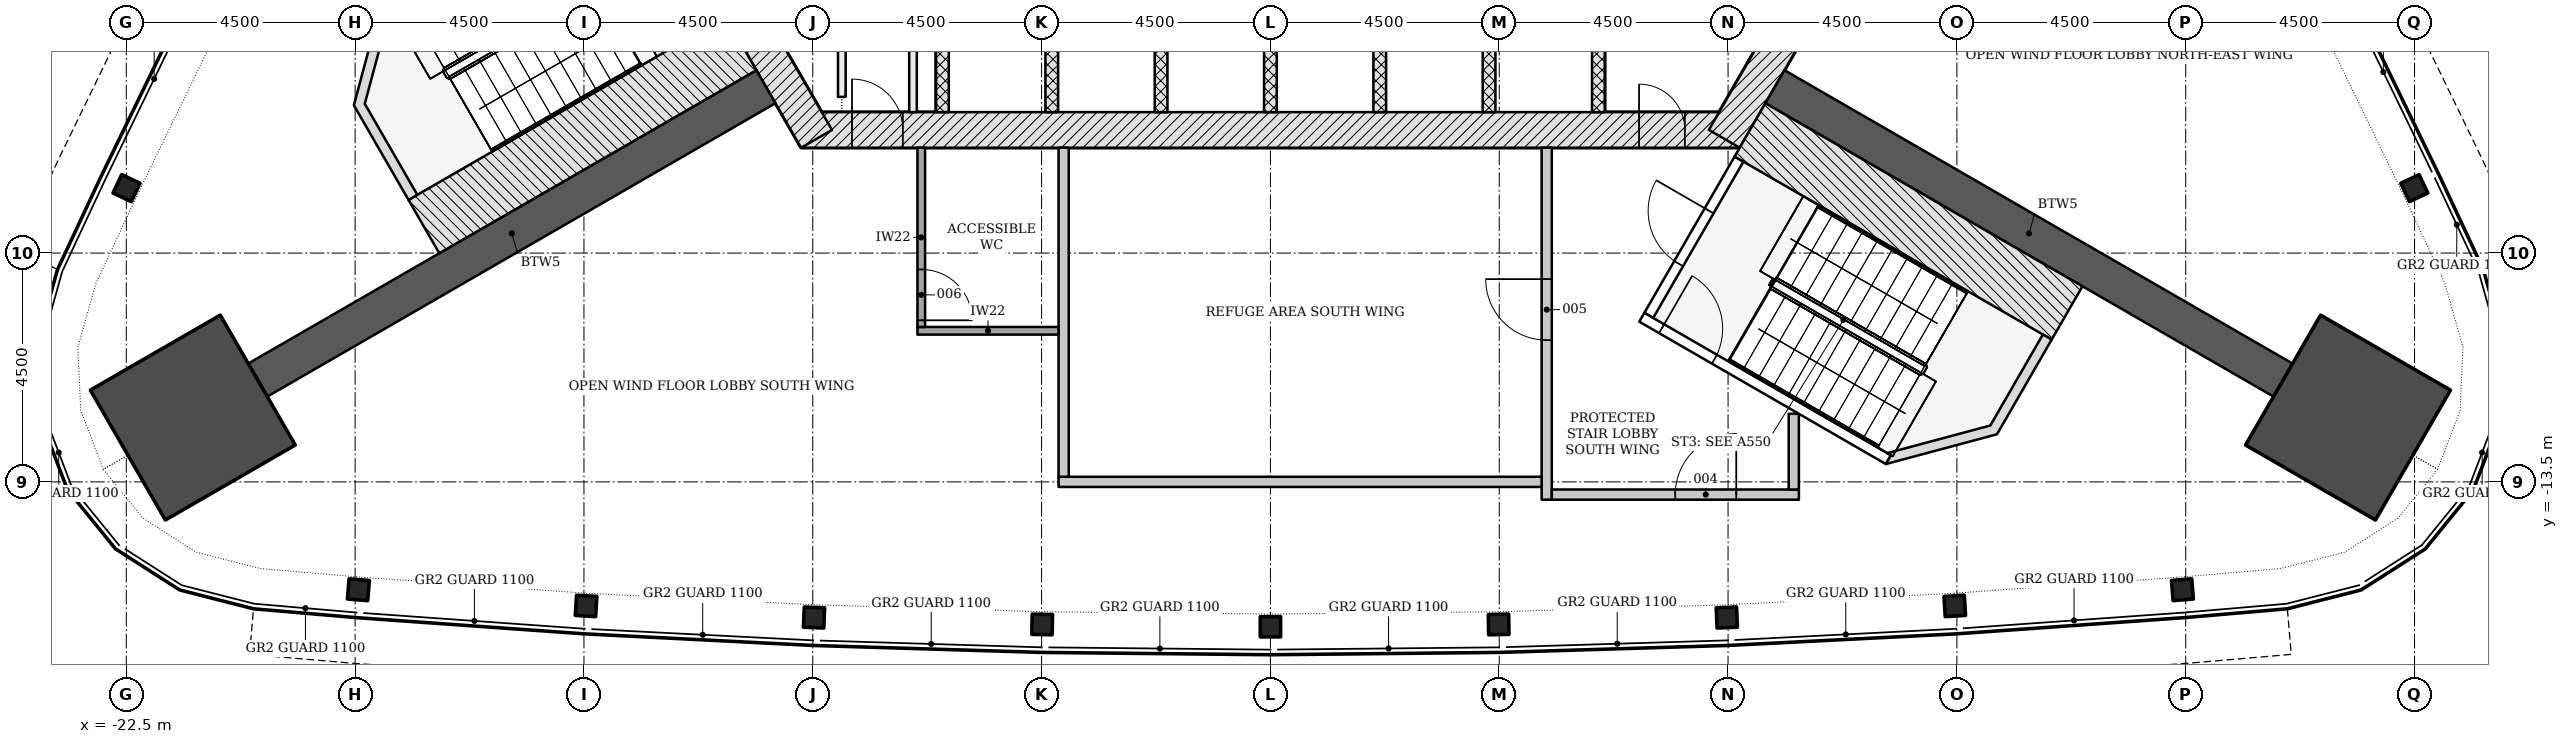
"""IFC4 building model, lengths in metres.
Left out: names, types, materials, properties, quantities, classifications, styles, units other than length and angle.
Written with IfcOpenShell. Run it as: python <this file> out.ifc"""

import sys

from ifc_helpers import new_model, si_unit, direction, frame, frame_2d, origin, origin_2d, place, context, subcontext, project, spatial, polyline, rectangle, i_section, outline, extrude, element, fill, save


model = new_model("IFC4")
c1 = context("Model", 3, precision=1e-05, world=origin(), true_north=direction((0.0, 1.0)))
c2 = subcontext(c1, "Body", "Model", "MODEL_VIEW")
j1 = project(units=[si_unit("LENGTHUNIT", "METRE"), si_unit("PLANEANGLEUNIT", "RADIAN")], contexts=[c1])
p1 = place(None, origin())
s1 = spatial("IfcSite", under=j1, at=p1, CompositionType="ELEMENT")
p2 = place(p1, origin())
s2 = spatial("IfcBuilding", under=s1, at=p2, CompositionType="ELEMENT")
p3 = place(p2, frame((0.0, 0.0, 127.5)))
s3 = spatial("IfcBuildingStorey", under=s2, at=p3, CompositionType="ELEMENT", Elevation=127.5)
p4 = place(p3, frame((-9.229, -6.578, -0.3), z_axis=(0.0, 0.0, 1.0), x_axis=(1.0, 0.0, 0.0)))
e1 = element("IfcWall", 1, at=p4, inside=s3, PredefinedType="SHEAR", context=c2, shape_type="SweptSolid", body=[
    extrude(rectangle(XDim=18.458, YDim=0.7, at=frame_2d((9.229, 0.0))), origin(), (0.0, 0.0, 1.0), 7.2),
])
p5 = place(p4, frame((1.0, 0.0, 0.3)))
e2 = element("IfcOpeningElement", 2, at=p5, cuts=e1, PredefinedType="OPENING", context=c2, shape_type="SweptSolid", body=[
    extrude(rectangle(XDim=1.0, YDim=2.1, at=frame_2d((0.5, 1.05))), frame((0.0, 0.36, 0.0), z_axis=(0.0, -1.0, 0.0), x_axis=(1.0, 0.0, 0.0)), (0.0, 0.0, 1.0), 0.72),
])
p6 = place(p4, frame((16.479, 0.0, 0.3)))
e3 = element("IfcOpeningElement", 3, at=p6, cuts=e1, PredefinedType="OPENING", context=c2, shape_type="SweptSolid", body=[
    extrude(rectangle(XDim=0.9, YDim=2.1, at=frame_2d((0.45, 1.05))), frame((0.0, 0.36, 0.0), z_axis=(0.0, -1.0, 0.0), x_axis=(1.0, 0.0, 0.0)), (0.0, 0.0, 1.0), 0.72),
])
for number, where, z_axis, x_axis in (
    (4, (8.926, -6.753, -0.3), (0.0, 0.0, 1.0), (0.5, 0.866, 0.0)),
    (5, (-10.311, -4.353, -0.3), (0.0, 0.0, 1.0), (0.5, -0.866, 0.0)),
):
    element("IfcWall", number, at=place(p3, frame(where, z_axis=z_axis, x_axis=x_axis)), inside=s3, PredefinedType="SHEAR", context=c2, shape_type="SweptSolid", body=[
        extrude(rectangle(XDim=2.771, YDim=0.7, at=frame_2d((1.386, 0.0))), origin(), (0.0, 0.0, 1.0), 7.2),
    ])
for number, where, z_axis, x_axis in (
    (6, (-9.922, -5.728, -0.3), (0.0, 0.0, 1.0), (-0.866, -0.5, 0.0)),
    (7, (9.922, -5.728, -0.3), (0.0, 0.0, 1.0), (0.866, -0.5, 0.0)),
):
    element("IfcWall", number, at=place(p3, frame(where, z_axis=z_axis, x_axis=x_axis)), inside=s3, PredefinedType="SHEAR", context=c2, shape_type="SweptSolid", body=[
        extrude(rectangle(XDim=11.539, YDim=0.75, at=frame_2d((5.769, 0.0))), origin(), (0.0, 0.0, 1.0), 7.2),
    ])
for number, where, z_axis, x_axis in (
    (8, (-21.192, -12.235, -0.3), (0.0, 0.0, 1.0), (-0.866, -0.5, 0.0)),
    (9, (21.192, -12.235, -0.3), (0.0, 0.0, 1.0), (0.866, -0.5, 0.0)),
):
    element("IfcColumn", number, at=place(p3, frame(where, z_axis=z_axis, x_axis=x_axis)), inside=s3, PredefinedType="COLUMN", context=c2, shape_type="SweptSolid", body=[
        extrude(rectangle(XDim=2.95, YDim=2.95, at=origin_2d()), origin(), (0.0, 0.0, 1.0), 7.2),
    ])
for number, where, z_axis, x_axis in (
    (10, (-22.496, -7.722, -0.3), (0.0, 0.0, 1.0), (-0.428, -0.904, 0.0)),
    (11, (-17.936, -15.621, -0.3), (0.0, 0.0, 1.0), (0.997, -0.081, 0.0)),
    (12, (-13.458, -15.939, -0.3), (0.0, 0.0, 1.0), (0.998, -0.061, 0.0)),
    (13, (-8.975, -16.167, -0.3), (0.0, 0.0, 1.0), (0.999, -0.041, 0.0)),
    (14, (-4.489, -16.304, -0.3), (0.0, 0.0, 1.0), (1.0, -0.02, 0.0)),
    (15, (0.0, -16.349, -0.3), (0.0, 0.0, 1.0), (1.0, 0.0, 0.0)),
    (16, (4.489, -16.304, -0.3), (0.0, 0.0, 1.0), (1.0, 0.02, 0.0)),
    (17, (8.975, -16.167, -0.3), (0.0, 0.0, 1.0), (0.999, 0.041, 0.0)),
    (18, (13.458, -15.939, -0.3), (0.0, 0.0, 1.0), (0.998, 0.061, 0.0)),
    (19, (17.936, -15.621, -0.3), (0.0, 0.0, 1.0), (0.997, 0.081, 0.0)),
    (20, (22.496, -7.722, -0.3), (0.0, 0.0, 1.0), (-0.428, 0.904, 0.0)),
):
    element("IfcColumn", number, at=place(p3, frame(where, z_axis=z_axis, x_axis=x_axis)), inside=s3, PredefinedType="COLUMN", context=c2, shape_type="SweptSolid", body=[
        extrude(i_section(OverallWidth=0.401, OverallDepth=0.399, WebThickness=0.025, FlangeThickness=0.04, FilletRadius=0.015, at=origin_2d()), origin(), (0.0, 0.0, 1.0), 7.2),
    ])
for number, where, z_axis, x_axis in (
    (21, (-6.45, -6.228, -0.3), (0.0, 0.0, 1.0), (0.0, 1.0, 0.0)),
    (22, (-4.3, -6.228, -0.3), (0.0, 0.0, 1.0), (0.0, 1.0, 0.0)),
    (23, (-2.15, -6.228, -0.3), (0.0, 0.0, 1.0), (0.0, 1.0, 0.0)),
    (24, (0.0, -6.228, -0.3), (0.0, 0.0, 1.0), (0.0, 1.0, 0.0)),
    (25, (2.15, -6.228, -0.3), (0.0, 0.0, 1.0), (0.0, 1.0, 0.0)),
    (26, (4.3, -6.228, -0.3), (0.0, 0.0, 1.0), (0.0, 1.0, 0.0)),
    (27, (6.45, -6.228, -0.3), (0.0, 0.0, 1.0), (0.0, 1.0, 0.0)),
):
    element("IfcWall", number, at=place(p3, frame(where, z_axis=z_axis, x_axis=x_axis)), inside=s3, PredefinedType="PARTITIONING", context=c2, shape_type="SweptSolid", body=[
        extrude(rectangle(XDim=2.5, YDim=0.25, at=frame_2d((1.25, 0.0))), origin(), (0.0, 0.0, 1.0), 7.2),
    ])
p7 = place(p3, frame((-8.429, -5.928, 0.0), z_axis=(0.0, 0.0, 1.0), x_axis=(0.0, 1.0, 0.0)))
e28 = element("IfcWall", 28, at=p7, inside=s3, PredefinedType="PARTITIONING", context=c2, shape_type="SweptSolid", body=[
    extrude(rectangle(XDim=3.656, YDim=0.15, at=frame_2d((1.828, 0.0))), origin(), (0.0, 0.0, 1.0), 6.9),
])
p8 = place(p7, frame((1.378, 0.0, 0.0)))
e29 = element("IfcOpeningElement", 29, at=p8, cuts=e28, PredefinedType="OPENING", context=c2, shape_type="SweptSolid", body=[
    extrude(rectangle(XDim=0.9, YDim=2.1, at=frame_2d((0.45, 1.05))), frame((0.0, 0.085, 0.0), z_axis=(0.0, -1.0, 0.0), x_axis=(1.0, 0.0, 0.0)), (0.0, 0.0, 1.0), 0.17),
])
p9 = place(p3, frame((-7.029, -2.8, 0.0), z_axis=(0.0, 0.0, 1.0), x_axis=(0.0, -1.0, 0.0)))
e30 = element("IfcWall", 30, at=p9, inside=s3, PredefinedType="PARTITIONING", context=c2, shape_type="SweptSolid", body=[
    extrude(rectangle(XDim=3.428, YDim=0.15, at=frame_2d((1.714, 0.0))), origin(), (0.0, 0.0, 1.0), 6.9),
])
p10 = place(p9, frame((1.264, 0.0, 0.0)))
e31 = element("IfcOpeningElement", 31, at=p10, cuts=e30, PredefinedType="OPENING", context=c2, shape_type="SweptSolid", body=[
    extrude(rectangle(XDim=0.9, YDim=2.1, at=frame_2d((0.45, 1.05))), frame((0.0, 0.085, 0.0), z_axis=(0.0, -1.0, 0.0), x_axis=(1.0, 0.0, 0.0)), (0.0, 0.0, 1.0), 0.17),
])
p11 = place(p3, frame((-10.412, -4.879, -0.3), z_axis=(0.0, 0.0, 1.0), x_axis=(-0.866026919366, -0.499997374926, 0.0)))
e32 = element("IfcWall", 32, at=p11, inside=s3, PredefinedType="SHEAR", context=c2, shape_type="SweptSolid", body=[
    extrude(rectangle(XDim=7.2, YDim=1.211, at=frame_2d((3.6, 0.0))), origin(), (0.0, 0.0, 1.0), 7.2),
])
p12 = place(p3, frame((0.0, 0.0, -0.3)))
e33 = element("IfcWall", 33, at=p12, inside=s3, PredefinedType="SHEAR", context=c2, shape_type="SweptSolid", body=[
    extrude(outline(polyline([(-17.439, -3.907), (-18.025, -6.093), (-16.95, -7.955), (-16.777, -7.855), (-17.81, -6.065), (-17.267, -4.039), (-17.339, -4.081), (-17.339, -4.081), (-17.339, -4.081), (-17.339, -4.081), (-17.339, -4.081), (-17.339, -4.081), (-17.339, -4.081), (-17.339, -4.081), (-17.339, -4.081), (-17.339, -4.081), (-17.339, -4.081), (-17.339, -4.081), (-17.339, -4.081), (-17.339, -4.081), (-17.339, -4.081), (-17.339, -4.081), (-17.339, -4.081), (-17.439, -3.907)])), origin(), (0.0, 0.0, 1.0), 7.2),
])
p13 = place(p3, frame((7.44, -10.226, -0.3), z_axis=(0.0, 0.0, 1.0), x_axis=(0.500022077904, 0.866012656725, 0.0)))
e34 = element("IfcWall", 34, at=p13, inside=s3, PredefinedType="SHEAR", context=c2, shape_type="SweptSolid", body=[
    extrude(rectangle(XDim=3.55, YDim=0.2, at=frame_2d((1.775, 0.0))), origin(), (0.0, 0.0, 1.0), 7.2),
])
p14 = place(p13, frame((1.175, 0.0, 0.3)))
e35 = element("IfcOpeningElement", 35, at=p14, cuts=e34, PredefinedType="OPENING", context=c2, shape_type="SweptSolid", body=[
    extrude(rectangle(XDim=1.2, YDim=2.1, at=frame_2d((0.6, 1.05))), frame((0.0, 0.11, 0.0), z_axis=(0.0, -1.0, 0.0), x_axis=(1.0, 0.0, 0.0)), (0.0, 0.0, 1.0), 0.22),
])
p15 = place(p3, frame((7.304, -10.262, -0.3), z_axis=(0.0, 0.0, 1.0), x_axis=(0.866026594901, -0.49999793692, 0.0)))
e36 = element("IfcWall", 36, at=p15, inside=s3, PredefinedType="SHEAR", context=c2, shape_type="SweptSolid", body=[
    extrude(rectangle(XDim=5.6, YDim=0.2, at=frame_2d((2.8, 0.0))), origin(), (0.0, 0.0, 1.0), 7.2),
])
p16 = place(p15, frame((0.45, 0.0, 0.3)))
e37 = element("IfcOpeningElement", 37, at=p16, cuts=e36, PredefinedType="OPENING", context=c2, shape_type="SweptSolid", body=[
    extrude(rectangle(XDim=1.2, YDim=2.1, at=frame_2d((0.6, 1.05))), frame((0.0, 0.11, 0.0), z_axis=(0.0, -1.0, 0.0), x_axis=(1.0, 0.0, 0.0)), (0.0, 0.0, 1.0), 0.22),
])
p17 = place(p3, frame((9.431, -6.577, -0.3), z_axis=(0.0, 0.0, 1.0), x_axis=(0.866018442252, -0.500012057535, 0.0)))
e38 = element("IfcWall", 38, at=p17, inside=s3, PredefinedType="SHEAR", context=c2, shape_type="SweptSolid", body=[
    extrude(rectangle(XDim=7.2, YDim=1.211, at=frame_2d((3.6, 0.0))), origin(), (0.0, 0.0, 1.0), 7.2),
])
p18 = place(p3, frame((0.0, 0.0, -0.3)))
e39 = element("IfcWall", 39, at=p18, inside=s3, PredefinedType="SHEAR", context=c2, shape_type="SweptSolid", body=[
    extrude(outline(polyline([(12.104, -13.149), (14.289, -12.563), (15.364, -10.701), (15.191, -10.601), (14.157, -12.392), (12.132, -12.934), (12.204, -12.976), (12.204, -12.976), (12.204, -12.976), (12.204, -12.976), (12.204, -12.976), (12.204, -12.976), (12.204, -12.976), (12.204, -12.976), (12.204, -12.976), (12.204, -12.976), (12.204, -12.976), (12.204, -12.976), (12.204, -12.976), (12.204, -12.976), (12.204, -12.976), (12.204, -12.976), (12.204, -12.976), (12.104, -13.149)])), origin(), (0.0, 0.0, 1.0), 7.2),
])
p19 = place(p3, frame((5.434, -13.85, 0.0), z_axis=(0.0, 0.0, 1.0), x_axis=(0.0, 1.0, 0.0)))
e40 = element("IfcWall", 40, at=p19, inside=s3, PredefinedType="PARTITIONING", context=c2, shape_type="SweptSolid", body=[
    extrude(rectangle(XDim=6.922, YDim=0.2, at=frame_2d((3.461, 0.0))), origin(), (0.0, 0.0, 1.0), 6.9),
])
p20 = place(p19, frame((3.138, 0.0, 0.0)))
e41 = element("IfcOpeningElement", 41, at=p20, cuts=e40, PredefinedType="OPENING", context=c2, shape_type="SweptSolid", body=[
    extrude(rectangle(XDim=1.2, YDim=2.1, at=frame_2d((0.6, 1.05))), frame((0.0, 0.11, 0.0), z_axis=(0.0, -1.0, 0.0), x_axis=(1.0, 0.0, 0.0)), (0.0, 0.0, 1.0), 0.22),
])
p21 = place(p3, frame((-4.167, -13.499, 0.0), z_axis=(0.0, 0.0, 1.0), x_axis=(1.0, 0.0, 0.0)))
e42 = element("IfcWall", 42, at=p21, inside=s3, PredefinedType="PARTITIONING", context=c2, shape_type="SweptSolid", body=[
    extrude(rectangle(XDim=9.5, YDim=0.2, at=frame_2d((4.75, 0.0))), origin(), (0.0, 0.0, 1.0), 6.347),
])
p22 = place(p3, frame((5.534, -13.75, 0.0), z_axis=(0.0, 0.0, 1.0), x_axis=(1.0, 0.0, 0.0)))
e43 = element("IfcWall", 43, at=p22, inside=s3, PredefinedType="PARTITIONING", context=c2, shape_type="SweptSolid", body=[
    extrude(rectangle(XDim=4.859, YDim=0.2, at=frame_2d((2.429, 0.0))), origin(), (0.0, 0.0, 1.0), 6.423),
])
p23 = place(p22, frame((2.427, 0.0, 0.0)))
e44 = element("IfcOpeningElement", 44, at=p23, cuts=e43, PredefinedType="OPENING", context=c2, shape_type="SweptSolid", body=[
    extrude(rectangle(XDim=1.2, YDim=2.1, at=frame_2d((0.6, 1.05))), frame((0.0, 0.11, 0.0), z_axis=(0.0, -1.0, 0.0), x_axis=(1.0, 0.0, 0.0)), (0.0, 0.0, 1.0), 0.22),
])
p24 = place(p3, frame((10.292, -13.65, 0.0), z_axis=(0.0, 0.0, 1.0), x_axis=(0.0, 1.0, 0.0)))
e45 = element("IfcWall", 45, at=p24, inside=s3, PredefinedType="PARTITIONING", context=c2, shape_type="SweptSolid", body=[
    extrude(rectangle(XDim=1.489, YDim=0.2, at=frame_2d((0.744, 0.0))), origin(), (0.0, 0.0, 1.0), 6.9),
])
p25 = place(p3, frame((-4.066, -13.399, 0.0), z_axis=(0.0, 0.0, 1.0), x_axis=(0.0, 1.0, 0.0)))
e46 = element("IfcWall", 46, at=p25, inside=s3, PredefinedType="PARTITIONING", context=c2, shape_type="SweptSolid", body=[
    extrude(rectangle(XDim=6.471, YDim=0.2, at=frame_2d((3.235, 0.0))), origin(), (0.0, 0.0, 1.0), 6.9),
])
p26 = place(p3, frame((-6.941, -10.528, 0.0), z_axis=(0.0, 0.0, 1.0), x_axis=(1.0, 0.0, 0.0)))
e47 = element("IfcWall", 47, at=p26, inside=s3, PredefinedType="PARTITIONING", context=c2, shape_type="SweptSolid", body=[
    extrude(rectangle(XDim=2.775, YDim=0.15, at=frame_2d((1.387, 0.0))), origin(), (0.0, 0.0, 1.0), 6.347),
])
p27 = place(p3, frame((-6.866, -6.928, 0.0), z_axis=(0.0, 0.0, 1.0), x_axis=(0.0, -1.0, 0.0)))
e48 = element("IfcWall", 48, at=p27, inside=s3, PredefinedType="PARTITIONING", context=c2, shape_type="SweptSolid", body=[
    extrude(rectangle(XDim=3.525, YDim=0.15, at=frame_2d((1.762, 0.0))), origin(), (0.0, 0.0, 1.0), 6.9),
])
p28 = place(p27, frame((2.394, 0.0, 0.0)))
e49 = element("IfcOpeningElement", 49, at=p28, cuts=e48, PredefinedType="OPENING", context=c2, shape_type="SweptSolid", body=[
    extrude(rectangle(XDim=1.0, YDim=2.1, at=frame_2d((0.5, 1.05))), frame((0.0, 0.085, 0.0), z_axis=(0.0, -1.0, 0.0), x_axis=(1.0, 0.0, 0.0)), (0.0, 0.0, 1.0), 0.17),
])
p29 = place(p5, origin())
e50 = element("IfcDoor", 50, at=p29, inside=s3, OperationType="SINGLE_SWING_LEFT", PredefinedType="DOOR", context=c2, shape_type="SweptSolid", body=[
    extrude(rectangle(XDim=1.0, YDim=2.1, at=frame_2d((0.5, 1.05))), frame((0.0, 0.075, 0.0), z_axis=(0.0, -1.0, 0.0), x_axis=(1.0, 0.0, 0.0)), (0.0, 0.0, 1.0), 0.15),
])
fill(e2, e50)
p30 = place(p6, origin())
e51 = element("IfcDoor", 51, at=p30, inside=s3, OperationType="SINGLE_SWING_LEFT", PredefinedType="DOOR", context=c2, shape_type="SweptSolid", body=[
    extrude(rectangle(XDim=0.9, YDim=2.1, at=frame_2d((0.45, 1.05))), frame((0.0, 0.075, 0.0), z_axis=(0.0, -1.0, 0.0), x_axis=(1.0, 0.0, 0.0)), (0.0, 0.0, 1.0), 0.15),
])
fill(e3, e51)
p31 = place(p14, origin())
e52 = element("IfcDoor", 52, at=p31, inside=s3, OperationType="SINGLE_SWING_RIGHT", PredefinedType="DOOR", context=c2, shape_type="SweptSolid", body=[
    extrude(rectangle(XDim=1.2, YDim=2.1, at=frame_2d((0.6, 1.05))), frame((0.0, 0.025, 0.0), z_axis=(0.0, -1.0, 0.0), x_axis=(1.0, 0.0, 0.0)), (0.0, 0.0, 1.0), 0.05),
])
fill(e35, e52)
p32 = place(p16, origin())
e53 = element("IfcDoor", 53, at=p32, inside=s3, OperationType="SINGLE_SWING_LEFT", PredefinedType="DOOR", context=c2, shape_type="SweptSolid", body=[
    extrude(rectangle(XDim=1.2, YDim=2.1, at=frame_2d((0.6, 1.05))), frame((0.0, 0.025, 0.0), z_axis=(0.0, -1.0, 0.0), x_axis=(1.0, 0.0, 0.0)), (0.0, 0.0, 1.0), 0.05),
])
fill(e37, e53)
p33 = place(p23, origin())
e54 = element("IfcDoor", 54, at=p33, inside=s3, OperationType="SINGLE_SWING_RIGHT", PredefinedType="DOOR", context=c2, shape_type="SweptSolid", body=[
    extrude(rectangle(XDim=1.2, YDim=2.1, at=frame_2d((0.6, 1.05))), frame((0.0, 0.025, 0.0), z_axis=(0.0, -1.0, 0.0), x_axis=(1.0, 0.0, 0.0)), (0.0, 0.0, 1.0), 0.05),
])
fill(e44, e54)
p34 = place(p20, origin())
e55 = element("IfcDoor", 55, at=p34, inside=s3, OperationType="SINGLE_SWING_RIGHT", PredefinedType="DOOR", context=c2, shape_type="SweptSolid", body=[
    extrude(rectangle(XDim=1.2, YDim=2.1, at=frame_2d((0.6, 1.05))), frame((0.0, 0.025, 0.0), z_axis=(0.0, -1.0, 0.0), x_axis=(1.0, 0.0, 0.0)), (0.0, 0.0, 1.0), 0.05),
])
fill(e41, e55)
p35 = place(p28, origin())
e56 = element("IfcDoor", 56, at=p35, inside=s3, OperationType="SINGLE_SWING_RIGHT", PredefinedType="DOOR", context=c2, shape_type="SweptSolid", body=[
    extrude(rectangle(XDim=1.0, YDim=2.1, at=frame_2d((0.5, 1.05))), frame((0.0, 0.025, 0.0), z_axis=(0.0, -1.0, 0.0), x_axis=(1.0, 0.0, 0.0)), (0.0, 0.0, 1.0), 0.05),
])
fill(e49, e56)
save(model, sys.argv[1])
